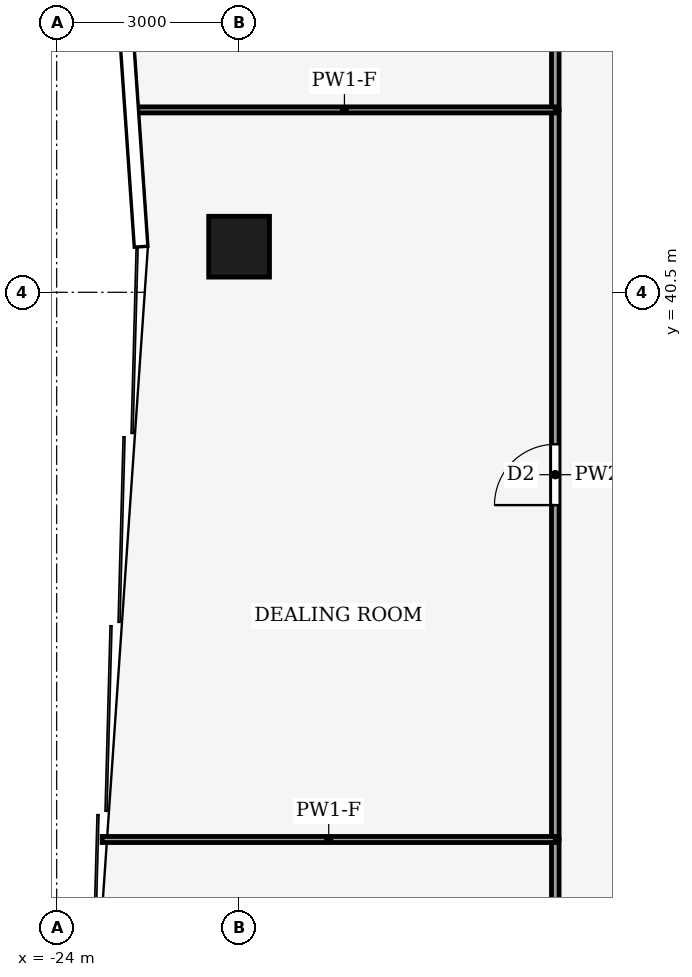
"""IFC4 building model, lengths in metres.
Left out: names, types, materials, properties, quantities, classifications, styles, units other than length and angle.
Written with IfcOpenShell. Run it as: python <this file> out.ifc"""

import sys

from ifc_helpers import new_model, si_unit, direction, frame, frame_2d, origin, origin_2d, place, context, subcontext, project, spatial, rectangle, hollow_rectangle, extrude, element, fill, save


model = new_model("IFC4")
c1 = context("Model", 3, precision=1e-05, world=origin(), true_north=direction((0.0, 1.0)))
c2 = subcontext(c1, "Body", "Model", "MODEL_VIEW")
j1 = project(units=[si_unit("LENGTHUNIT", "METRE"), si_unit("PLANEANGLEUNIT", "RADIAN")], contexts=[c1])
p1 = place(None, origin())
s1 = spatial("IfcSite", under=j1, at=p1, CompositionType="ELEMENT")
p2 = place(p1, origin())
s2 = spatial("IfcBuilding", under=s1, at=p2, CompositionType="ELEMENT")
p3 = place(p2, frame((0.0, 0.0, 254.0)))
s3 = spatial("IfcBuildingStorey", under=s2, at=p3, CompositionType="ELEMENT", Elevation=254.0)
p4 = place(p3, frame((-21.0, 41.25, 0.0), z_axis=(0.0, 0.0, 1.0), x_axis=(1.0, 0.0, 0.0)))
e1 = element("IfcColumn", 1, at=p4, inside=s3, PredefinedType="COLUMN", context=c2, shape_type="SweptSolid", body=[
    extrude(hollow_rectangle(XDim=1.0, YDim=1.0, WallThickness=0.045, at=origin_2d()), origin(), (0.0, 0.0, 1.0), 4.0),
])
p5 = place(p3, frame((-15.8, 28.5, 0.0), z_axis=(0.0, 0.0, 1.0), x_axis=(0.0, 1.0, 0.0)))
e2 = element("IfcWall", 2, at=p5, inside=s3, PredefinedType="PARTITIONING", context=c2, shape_type="SweptSolid", body=[
    extrude(rectangle(XDim=3.0, YDim=0.125, at=frame_2d((1.5, 0.0))), origin(), (0.0, 0.0, 1.0), 3.87),
])
p6 = place(p5, frame((1.05, 0.0, 0.0)))
e3 = element("IfcOpeningElement", 3, at=p6, cuts=e2, PredefinedType="OPENING", context=c2, shape_type="SweptSolid", body=[
    extrude(rectangle(XDim=0.9, YDim=2.1, at=frame_2d((0.45, 1.05))), frame((0.0, 0.073, 0.0), z_axis=(0.0, -1.0, 0.0), x_axis=(1.0, 0.0, 0.0)), (0.0, 0.0, 1.0), 0.145),
])
p7 = place(p3, frame((-15.8, 31.5, 0.0), z_axis=(0.0, 0.0, 1.0), x_axis=(0.0, 1.0, 0.0)))
e4 = element("IfcWall", 4, at=p7, inside=s3, PredefinedType="PARTITIONING", context=c2, shape_type="SweptSolid", body=[
    extrude(rectangle(XDim=12.0, YDim=0.125, at=frame_2d((6.0, 0.0))), origin(), (0.0, 0.0, 1.0), 3.14),
])
p8 = place(p7, frame((5.5, 0.0, 0.0)))
e5 = element("IfcOpeningElement", 5, at=p8, cuts=e4, PredefinedType="OPENING", context=c2, shape_type="SweptSolid", body=[
    extrude(rectangle(XDim=1.0, YDim=2.1, at=frame_2d((0.5, 1.05))), frame((0.0, 0.073, 0.0), z_axis=(0.0, -1.0, 0.0), x_axis=(1.0, 0.0, 0.0)), (0.0, 0.0, 1.0), 0.145),
])
p9 = place(p3, frame((-15.8, 43.5, 0.0), z_axis=(0.0, 0.0, 1.0), x_axis=(0.0, 1.0, 0.0)))
e6 = element("IfcWall", 6, at=p9, inside=s3, PredefinedType="PARTITIONING", context=c2, shape_type="SweptSolid", body=[
    extrude(rectangle(XDim=9.0, YDim=0.125, at=frame_2d((4.5, 0.0))), origin(), (0.0, 0.0, 1.0), 3.24),
])
p10 = place(p9, frame((4.0, 0.0, 0.0)))
e7 = element("IfcOpeningElement", 7, at=p10, cuts=e6, PredefinedType="OPENING", context=c2, shape_type="SweptSolid", body=[
    extrude(rectangle(XDim=1.0, YDim=2.1, at=frame_2d((0.5, 1.05))), frame((0.0, 0.073, 0.0), z_axis=(0.0, -1.0, 0.0), x_axis=(1.0, 0.0, 0.0)), (0.0, 0.0, 1.0), 0.145),
])
p11 = place(p3, frame((-15.8, 31.5, 0.0), z_axis=(0.0, 0.0, 1.0), x_axis=(-1.0, 0.0, 0.0)))
e8 = element("IfcWall", 8, at=p11, inside=s3, PredefinedType="PARTITIONING", context=c2, shape_type="SweptSolid", body=[
    extrude(rectangle(XDim=7.452, YDim=0.1, at=frame_2d((3.726, 0.0))), origin(), (0.0, 0.0, 1.0), 3.04),
])
p12 = place(p3, frame((-15.8, 43.5, 0.0), z_axis=(0.0, 0.0, 1.0), x_axis=(-1.0, 0.0, 0.0)))
e9 = element("IfcWall", 9, at=p12, inside=s3, PredefinedType="PARTITIONING", context=c2, shape_type="SweptSolid", body=[
    extrude(rectangle(XDim=6.935, YDim=0.1, at=frame_2d((3.468, 0.0))), origin(), (0.0, 0.0, 1.0), 3.04),
])
p13 = place(p8, origin())
e10 = element("IfcDoor", 10, at=p13, inside=s3, OperationType="SINGLE_SWING_LEFT", PredefinedType="DOOR", context=c2, shape_type="SweptSolid", body=[
    extrude(rectangle(XDim=1.0, YDim=2.1, at=frame_2d((0.5, 1.05))), frame((0.0, 0.025, 0.0), z_axis=(0.0, -1.0, 0.0), x_axis=(1.0, 0.0, 0.0)), (0.0, 0.0, 1.0), 0.05),
])
fill(e5, e10)
save(model, sys.argv[1])
